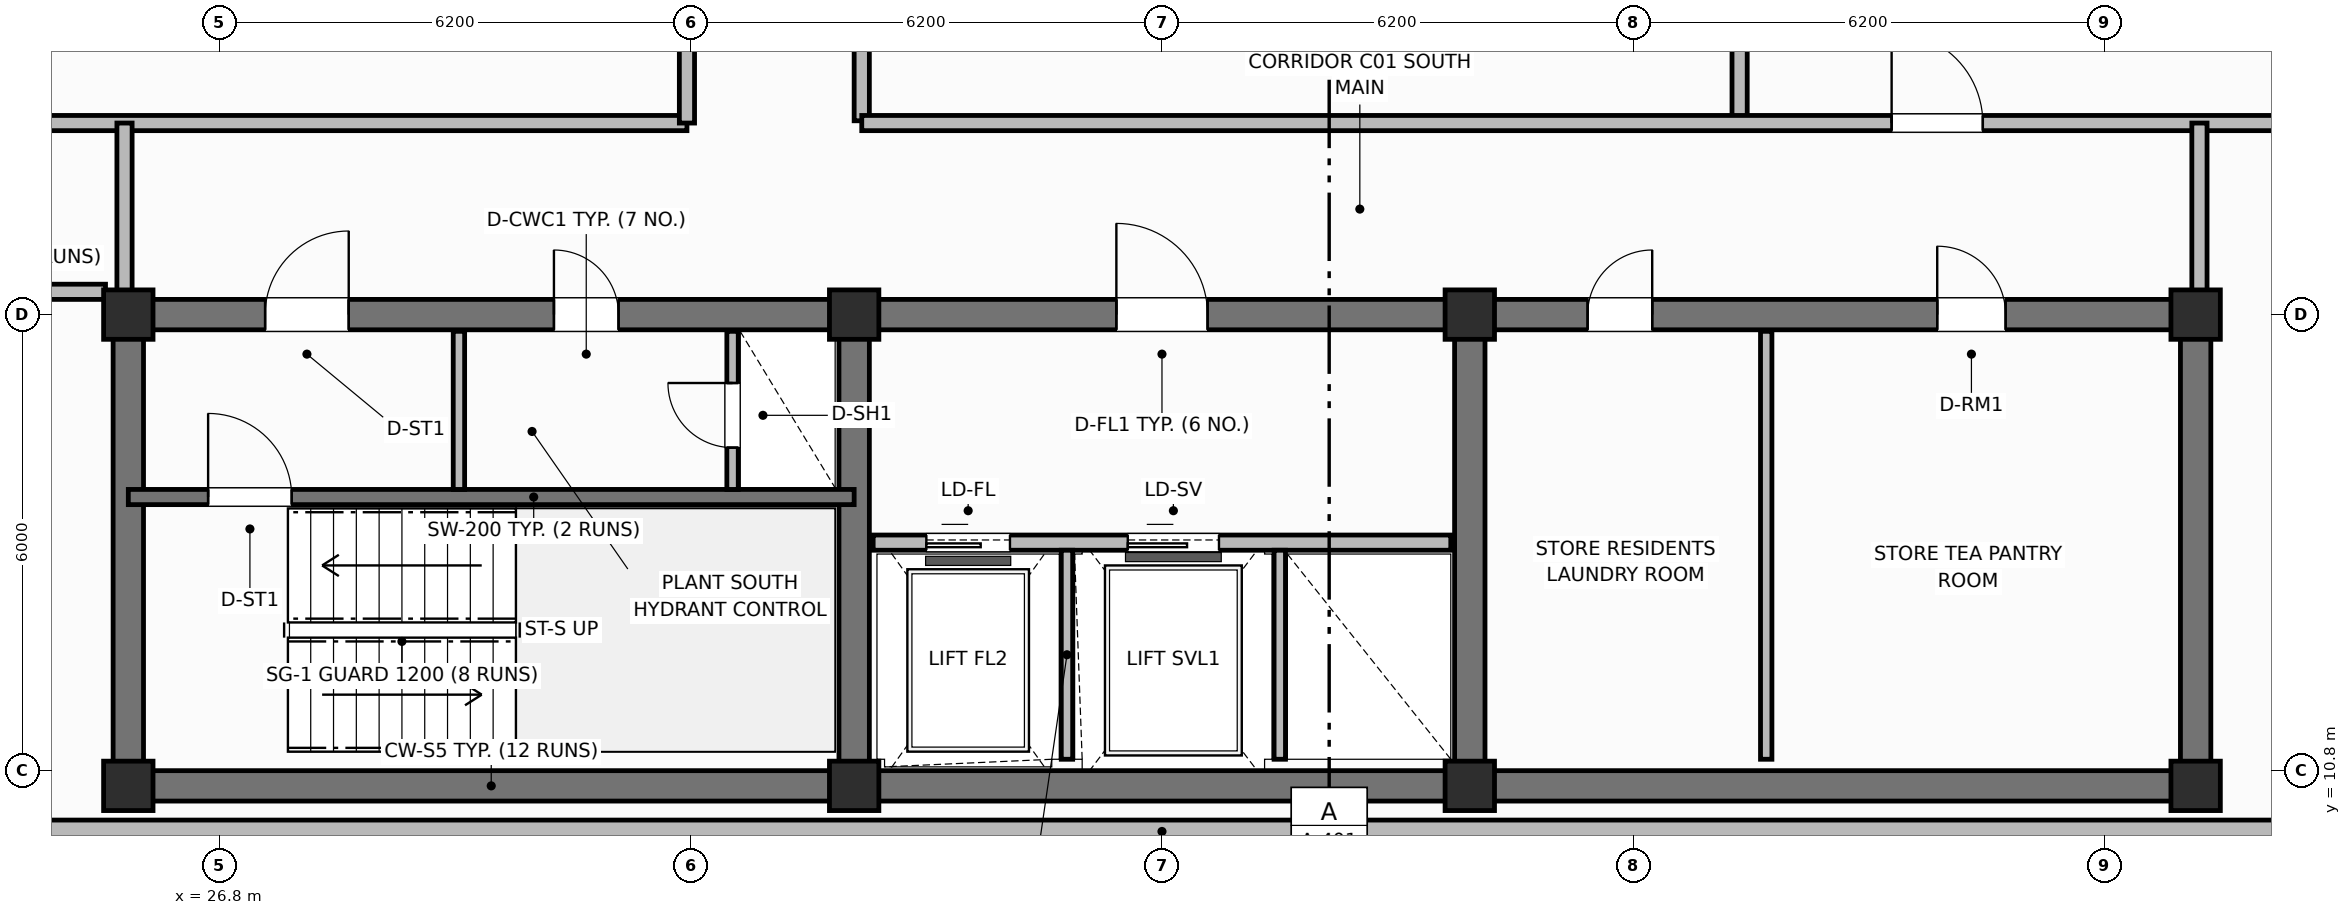
"""IFC4 building model, lengths in metres.
Left out: names, types, materials, properties, quantities, classifications, styles, units other than length and angle.
Written with IfcOpenShell. Run it as: python <this file> out.ifc"""

import sys

from ifc_helpers import new_model, si_unit, direction, frame, frame_2d, origin, origin_2d, place, context, subcontext, project, spatial, rectangle, extrude, element, fill, save


model = new_model("IFC4")
c1 = context("Model", 3, precision=1e-05, world=origin(), true_north=direction((0.0, 1.0)))
c2 = subcontext(c1, "Body", "Model", "MODEL_VIEW")
j1 = project(units=[si_unit("LENGTHUNIT", "METRE"), si_unit("PLANEANGLEUNIT", "RADIAN")], contexts=[c1])
p1 = place(None, origin())
s1 = spatial("IfcSite", under=j1, at=p1, CompositionType="ELEMENT")
p2 = place(p1, origin())
s2 = spatial("IfcBuilding", under=s1, at=p2, CompositionType="ELEMENT")
p3 = place(p2, frame((0.0, 0.0, 302.0)))
s3 = spatial("IfcBuildingStorey", under=s2, at=p3, CompositionType="ELEMENT", Elevation=302.0)
p4 = place(p3, frame((52.8, 10.6, 0.0), z_axis=(0.0, 0.0, 1.0), x_axis=(-1.0, 0.0, 0.0)))
e1 = element("IfcWall", 1, at=p4, inside=s3, PredefinedType="SHEAR", context=c2, shape_type="SweptSolid", body=[
    extrude(rectangle(XDim=27.2, YDim=0.4, at=frame_2d((13.6, 0.0))), origin(), (0.0, 0.0, 1.0), 3.6),
])
for number, where, z_axis, x_axis in (
    (2, (25.6, 10.8, 0.0), (0.0, 0.0, 1.0), (0.0, 1.0, 0.0)),
    (3, (52.8, 10.8, 0.0), (0.0, 0.0, 1.0), (0.0, 1.0, 0.0)),
):
    element("IfcWall", number, at=place(p3, frame(where, z_axis=z_axis, x_axis=x_axis)), inside=s3, PredefinedType="SHEAR", context=c2, shape_type="SweptSolid", body=[
        extrude(rectangle(XDim=5.8, YDim=0.4, at=frame_2d((2.9, 0.0))), origin(), (0.0, 0.0, 1.0), 3.6),
    ])
p5 = place(p3, frame((25.6, 16.8, 0.0), z_axis=(0.0, 0.0, 1.0), x_axis=(1.0, 0.0, 0.0)))
e4 = element("IfcWall", 4, at=p5, inside=s3, PredefinedType="SHEAR", context=c2, shape_type="SweptSolid", body=[
    extrude(rectangle(XDim=27.2, YDim=0.4, at=frame_2d((13.6, 0.0))), origin(), (0.0, 0.0, 1.0), 3.6),
])
p6 = place(p5, frame((1.8, 0.0, 0.0)))
e5 = element("IfcOpeningElement", 5, at=p6, cuts=e4, PredefinedType="OPENING", context=c2, shape_type="SweptSolid", body=[
    extrude(rectangle(XDim=1.1, YDim=2.15, at=frame_2d((0.55, 1.075))), frame((0.0, 0.21, 0.0), z_axis=(0.0, -1.0, 0.0), x_axis=(1.0, 0.0, 0.0)), (0.0, 0.0, 1.0), 0.42),
])
p7 = place(p5, frame((5.6, 0.0, 0.0)))
e6 = element("IfcOpeningElement", 6, at=p7, cuts=e4, PredefinedType="OPENING", context=c2, shape_type="SweptSolid", body=[
    extrude(rectangle(XDim=0.85, YDim=2.1, at=frame_2d((0.425, 1.05))), frame((0.0, 0.21, 0.0), z_axis=(0.0, -1.0, 0.0), x_axis=(1.0, 0.0, 0.0)), (0.0, 0.0, 1.0), 0.42),
])
p8 = place(p5, frame((13.0, 0.0, 0.0)))
e7 = element("IfcOpeningElement", 7, at=p8, cuts=e4, PredefinedType="OPENING", context=c2, shape_type="SweptSolid", body=[
    extrude(rectangle(XDim=1.2, YDim=2.15, at=frame_2d((0.6, 1.075))), frame((0.0, 0.21, 0.0), z_axis=(0.0, -1.0, 0.0), x_axis=(1.0, 0.0, 0.0)), (0.0, 0.0, 1.0), 0.42),
])
p9 = place(p5, frame((19.2, 0.0, 0.0)))
e8 = element("IfcOpeningElement", 8, at=p9, cuts=e4, PredefinedType="OPENING", context=c2, shape_type="SweptSolid", body=[
    extrude(rectangle(XDim=0.85, YDim=2.1, at=frame_2d((0.425, 1.05))), frame((0.0, 0.21, 0.0), z_axis=(0.0, -1.0, 0.0), x_axis=(1.0, 0.0, 0.0)), (0.0, 0.0, 1.0), 0.42),
])
p10 = place(p5, frame((23.8, 0.0, 0.0)))
e9 = element("IfcOpeningElement", 9, at=p10, cuts=e4, PredefinedType="OPENING", context=c2, shape_type="SweptSolid", body=[
    extrude(rectangle(XDim=0.9, YDim=2.1, at=frame_2d((0.45, 1.05))), frame((0.0, 0.21, 0.0), z_axis=(0.0, -1.0, 0.0), x_axis=(1.0, 0.0, 0.0)), (0.0, 0.0, 1.0), 0.42),
])
for number, where, z_axis, x_axis in (
    (10, (35.15, 10.8, 0.0), (0.0, 0.0, 1.0), (0.0, 1.0, 0.0)),
    (11, (43.25, 10.8, 0.0), (0.0, 0.0, 1.0), (0.0, 1.0, 0.0)),
):
    element("IfcWall", number, at=place(p3, frame(where, z_axis=z_axis, x_axis=x_axis)), inside=s3, PredefinedType="SHEAR", context=c2, shape_type="SweptSolid", body=[
        extrude(rectangle(XDim=5.8, YDim=0.4, at=frame_2d((2.9, 0.0))), origin(), (0.0, 0.0, 1.0), 3.6),
    ])
for number, where, z_axis, x_axis in (
    (12, (25.6, 10.6, 0.0), (0.0, 0.0, 1.0), (1.0, 0.0, 0.0)),
    (13, (25.6, 16.8, 0.0), (0.0, 0.0, 1.0), (1.0, 0.0, 0.0)),
    (14, (35.15, 10.6, 0.0), (0.0, 0.0, 1.0), (1.0, 0.0, 0.0)),
    (15, (35.15, 16.8, 0.0), (0.0, 0.0, 1.0), (1.0, 0.0, 0.0)),
    (16, (43.25, 10.6, 0.0), (0.0, 0.0, 1.0), (1.0, 0.0, 0.0)),
    (17, (43.25, 16.8, 0.0), (0.0, 0.0, 1.0), (1.0, 0.0, 0.0)),
    (18, (52.8, 10.6, 0.0), (0.0, 0.0, 1.0), (1.0, 0.0, 0.0)),
    (19, (52.8, 16.8, 0.0), (0.0, 0.0, 1.0), (1.0, 0.0, 0.0)),
):
    element("IfcColumn", number, at=place(p3, frame(where, z_axis=z_axis, x_axis=x_axis)), inside=s3, PredefinedType="COLUMN", context=c2, shape_type="SweptSolid", body=[
        extrude(rectangle(XDim=0.65, YDim=0.65, at=origin_2d()), origin(), (0.0, 0.0, 1.0), 3.6),
    ])
p11 = place(p3, frame((23.76, 10.0, 0.0), z_axis=(0.0, 0.0, 1.0), x_axis=(1.0, 0.0, 0.0)))
e20 = element("IfcWall", 20, at=p11, inside=s3, PredefinedType="SOLIDWALL", context=c2, shape_type="SweptSolid", body=[
    extrude(rectangle(XDim=30.88, YDim=0.3, at=frame_2d((15.44, 0.0))), origin(), (0.0, 0.0, 1.0), 2.84),
])
p12 = place(p3, frame((25.6, 14.4, 0.0), z_axis=(0.0, 0.0, 1.0), x_axis=(1.0, 0.0, 0.0)))
e21 = element("IfcWall", 21, at=p12, inside=s3, PredefinedType="SHEAR", context=c2, shape_type="SweptSolid", body=[
    extrude(rectangle(XDim=9.55, YDim=0.2, at=frame_2d((4.775, 0.0))), origin(), (0.0, 0.0, 1.0), 3.6),
])
p13 = place(p12, frame((1.05, 0.0, 0.0)))
e22 = element("IfcOpeningElement", 22, at=p13, cuts=e21, PredefinedType="OPENING", context=c2, shape_type="SweptSolid", body=[
    extrude(rectangle(XDim=1.1, YDim=2.15, at=frame_2d((0.55, 1.075))), frame((0.0, 0.11, 0.0), z_axis=(0.0, -1.0, 0.0), x_axis=(1.0, 0.0, 0.0)), (0.0, 0.0, 1.0), 0.22),
])
p14 = place(p3, frame((29.95, 14.5, 0.0), z_axis=(0.0, 0.0, 1.0), x_axis=(0.0, 1.0, 0.0)))
e23 = element("IfcWall", 23, at=p14, inside=s3, PredefinedType="PARTITIONING", context=c2, shape_type="SweptSolid", body=[
    extrude(rectangle(XDim=2.08, YDim=0.15, at=frame_2d((1.04, 0.0))), origin(), (0.0, 0.0, 1.0), 2.54),
])
p15 = place(p3, frame((33.55, 14.5, 0.0), z_axis=(0.0, 0.0, 1.0), x_axis=(0.0, 1.0, 0.0)))
e24 = element("IfcWall", 24, at=p15, inside=s3, PredefinedType="PARTITIONING", context=c2, shape_type="SweptSolid", body=[
    extrude(rectangle(XDim=2.08, YDim=0.15, at=frame_2d((1.04, 0.0))), origin(), (0.0, 0.0, 1.0), 2.54),
])
p16 = place(p15, frame((0.55, 0.0, 0.0)))
e25 = element("IfcOpeningElement", 25, at=p16, cuts=e24, PredefinedType="OPENING", context=c2, shape_type="SweptSolid", body=[
    extrude(rectangle(XDim=0.85, YDim=2.05, at=frame_2d((0.425, 1.025))), frame((0.0, 0.085, 0.0), z_axis=(0.0, -1.0, 0.0), x_axis=(1.0, 0.0, 0.0)), (0.0, 0.0, 1.0), 0.17),
])
p17 = place(p3, frame((35.4, 13.8, 0.0), z_axis=(0.0, 0.0, 1.0), x_axis=(1.0, 0.0, 0.0)))
e26 = element("IfcWall", 26, at=p17, inside=s3, PredefinedType="PARTITIONING", context=c2, shape_type="SweptSolid", body=[
    extrude(rectangle(XDim=7.6, YDim=0.2, at=frame_2d((3.8, 0.0))), origin(), (0.0, 0.0, 1.0), 2.2),
])
p18 = place(p17, frame((0.7, 0.0, 0.0)))
e27 = element("IfcOpeningElement", 27, at=p18, cuts=e26, PredefinedType="OPENING", context=c2, shape_type="SweptSolid", body=[
    extrude(rectangle(XDim=1.1, YDim=2.15, at=frame_2d((0.55, 1.075))), frame((0.0, 0.11, 0.0), z_axis=(0.0, -1.0, 0.0), x_axis=(1.0, 0.0, 0.0)), (0.0, 0.0, 1.0), 0.22),
])
p19 = place(p17, frame((3.35, 0.0, 0.0)))
e28 = element("IfcOpeningElement", 28, at=p19, cuts=e26, PredefinedType="OPENING", context=c2, shape_type="SweptSolid", body=[
    extrude(rectangle(XDim=1.2, YDim=2.15, at=frame_2d((0.6, 1.075))), frame((0.0, 0.11, 0.0), z_axis=(0.0, -1.0, 0.0), x_axis=(1.0, 0.0, 0.0)), (0.0, 0.0, 1.0), 0.22),
])
for number, where, z_axis, x_axis in (
    (29, (37.95, 10.95, 0.0), (0.0, 0.0, 1.0), (0.0, 1.0, 0.0)),
    (30, (40.75, 10.95, 0.0), (0.0, 0.0, 1.0), (0.0, 1.0, 0.0)),
):
    element("IfcWall", number, at=place(p3, frame(where, z_axis=z_axis, x_axis=x_axis)), inside=s3, PredefinedType="PARTITIONING", context=c2, shape_type="SweptSolid", body=[
        extrude(rectangle(XDim=2.75, YDim=0.15, at=frame_2d((1.375, 0.0))), origin(), (0.0, 0.0, 1.0), 2.54),
    ])
p20 = place(p3, frame((47.15, 10.95, 0.0), z_axis=(0.0, 0.0, 1.0), x_axis=(0.0, 1.0, 0.0)))
e31 = element("IfcWall", 31, at=p20, inside=s3, PredefinedType="PARTITIONING", context=c2, shape_type="SweptSolid", body=[
    extrude(rectangle(XDim=5.63, YDim=0.15, at=frame_2d((2.815, 0.0))), origin(), (0.0, 0.0, 1.0), 2.54),
])
p21 = place(p3, frame((21.53, 19.32, 0.0), z_axis=(0.0, 0.0, 1.0), x_axis=(1.0, 0.0, 0.0)))
e32 = element("IfcWall", 32, at=p21, inside=s3, PredefinedType="PARTITIONING", context=c2, shape_type="SweptSolid", body=[
    extrude(rectangle(XDim=11.42, YDim=0.2, at=frame_2d((5.71, 0.0))), origin(), (0.0, 0.0, 1.0), 2.54),
])
p22 = place(p3, frame((32.95, 19.32, 0.0), z_axis=(0.0, 0.0, 1.0), x_axis=(0.0, 1.0, 0.0)))
e33 = element("IfcWall", 33, at=p22, inside=s3, PredefinedType="PARTITIONING", context=c2, shape_type="SweptSolid", body=[
    extrude(rectangle(XDim=17.76, YDim=0.2, at=frame_2d((8.88, 0.0))), origin(), (0.0, 0.0, 1.0), 2.54),
])
p23 = place(p22, frame((6.0, 0.0, 0.0)))
e34 = element("IfcOpeningElement", 34, at=p23, cuts=e33, PredefinedType="OPENING", context=c2, shape_type="SweptSolid", body=[
    extrude(rectangle(XDim=1.2, YDim=2.15, at=frame_2d((0.6, 1.075))), frame((0.0, 0.11, 0.0), z_axis=(0.0, -1.0, 0.0), x_axis=(1.0, 0.0, 0.0)), (0.0, 0.0, 1.0), 0.22),
])
p24 = place(p3, frame((35.25, 19.35, 0.0), z_axis=(0.0, 0.0, 1.0), x_axis=(0.0, 1.0, 0.0)))
e35 = element("IfcWall", 35, at=p24, inside=s3, PredefinedType="PARTITIONING", context=c2, shape_type="SweptSolid", body=[
    extrude(rectangle(XDim=17.7, YDim=0.2, at=frame_2d((8.85, 0.0))), origin(), (0.0, 0.0, 1.0), 2.54),
])
p25 = place(p24, frame((6.0, 0.0, 0.0)))
e36 = element("IfcOpeningElement", 36, at=p25, cuts=e35, PredefinedType="OPENING", context=c2, shape_type="SweptSolid", body=[
    extrude(rectangle(XDim=1.2, YDim=2.15, at=frame_2d((0.6, 1.075))), frame((0.0, 0.11, 0.0), z_axis=(0.0, -1.0, 0.0), x_axis=(1.0, 0.0, 0.0)), (0.0, 0.0, 1.0), 0.22),
])
p26 = place(p3, frame((46.8, 19.35, 0.0), z_axis=(0.0, 0.0, 1.0), x_axis=(0.0, 1.0, 0.0)))
e37 = element("IfcWall", 37, at=p26, inside=s3, PredefinedType="PARTITIONING", context=c2, shape_type="SweptSolid", body=[
    extrude(rectangle(XDim=17.7, YDim=0.2, at=frame_2d((8.85, 0.0))), origin(), (0.0, 0.0, 1.0), 2.54),
])
p27 = place(p3, frame((35.25, 19.32, 0.0), z_axis=(0.0, 0.0, 1.0), x_axis=(1.0, 0.0, 0.0)))
e38 = element("IfcWall", 38, at=p27, inside=s3, PredefinedType="PARTITIONING", context=c2, shape_type="SweptSolid", body=[
    extrude(rectangle(XDim=21.62, YDim=0.2, at=frame_2d((10.81, 0.0))), origin(), (0.0, 0.0, 1.0), 2.54),
])
p28 = place(p27, frame((13.55, 0.0, 0.0)))
e39 = element("IfcOpeningElement", 39, at=p28, cuts=e38, PredefinedType="OPENING", context=c2, shape_type="SweptSolid", body=[
    extrude(rectangle(XDim=1.2, YDim=2.15, at=frame_2d((0.6, 1.075))), frame((0.0, 0.11, 0.0), z_axis=(0.0, -1.0, 0.0), x_axis=(1.0, 0.0, 0.0)), (0.0, 0.0, 1.0), 0.22),
])
for number, where, z_axis, x_axis in (
    (40, (52.85, 16.95, 0.0), (0.0, 0.0, 1.0), (0.0, 1.0, 0.0)),
    (41, (25.55, 16.95, 0.0), (0.0, 0.0, 1.0), (0.0, 1.0, 0.0)),
):
    element("IfcWall", number, at=place(p3, frame(where, z_axis=z_axis, x_axis=x_axis)), inside=s3, PredefinedType="PARTITIONING", context=c2, shape_type="SweptSolid", body=[
        extrude(rectangle(XDim=2.37, YDim=0.2, at=frame_2d((1.185, 0.0))), origin(), (0.0, 0.0, 1.0), 2.54),
    ])
p29 = place(p3, frame((21.53, 17.1, 0.0), z_axis=(0.0, 0.0, 1.0), x_axis=(1.0, 0.0, 0.0)))
e42 = element("IfcWall", 42, at=p29, inside=s3, PredefinedType="PARTITIONING", context=c2, shape_type="SweptSolid", body=[
    extrude(rectangle(XDim=3.77, YDim=0.2, at=frame_2d((1.885, 0.0))), origin(), (0.0, 0.0, 1.0), 2.54),
])
p30 = place(p13, origin())
e43 = element("IfcDoor", 43, at=p30, inside=s3, OperationType="SINGLE_SWING_LEFT", PredefinedType="DOOR", context=c2, shape_type="SweptSolid", body=[
    extrude(rectangle(XDim=1.1, YDim=2.15, at=frame_2d((0.55, 1.075))), frame((0.0, 0.025, 0.0), z_axis=(0.0, -1.0, 0.0), x_axis=(1.0, 0.0, 0.0)), (0.0, 0.0, 1.0), 0.05),
])
fill(e22, e43)
p31 = place(p16, origin())
e44 = element("IfcDoor", 44, at=p31, inside=s3, OperationType="SINGLE_SWING_RIGHT", PredefinedType="TRAPDOOR", context=c2, shape_type="SweptSolid", body=[
    extrude(rectangle(XDim=0.85, YDim=2.05, at=frame_2d((0.425, 1.025))), frame((0.0, 0.025, 0.0), z_axis=(0.0, -1.0, 0.0), x_axis=(1.0, 0.0, 0.0)), (0.0, 0.0, 1.0), 0.05),
])
fill(e25, e44)
p32 = place(p18, origin())
e45 = element("IfcDoor", 45, at=p32, inside=s3, OperationType="SLIDING_TO_LEFT", PredefinedType="DOOR", context=c2, shape_type="SweptSolid", body=[
    extrude(rectangle(XDim=1.1, YDim=2.15, at=frame_2d((0.55, 1.075))), frame((0.0, 0.025, 0.0), z_axis=(0.0, -1.0, 0.0), x_axis=(1.0, 0.0, 0.0)), (0.0, 0.0, 1.0), 0.05),
])
fill(e27, e45)
p33 = place(p19, origin())
e46 = element("IfcDoor", 46, at=p33, inside=s3, OperationType="SLIDING_TO_LEFT", PredefinedType="DOOR", context=c2, shape_type="SweptSolid", body=[
    extrude(rectangle(XDim=1.2, YDim=2.15, at=frame_2d((0.6, 1.075))), frame((0.0, 0.025, 0.0), z_axis=(0.0, -1.0, 0.0), x_axis=(1.0, 0.0, 0.0)), (0.0, 0.0, 1.0), 0.05),
])
fill(e28, e46)
p34 = place(p28, origin())
e47 = element("IfcDoor", 47, at=p34, inside=s3, OperationType="SINGLE_SWING_LEFT", PredefinedType="DOOR", context=c2, shape_type="SweptSolid", body=[
    extrude(rectangle(XDim=1.2, YDim=2.15, at=frame_2d((0.6, 1.075))), frame((0.0, 0.025, 0.0), z_axis=(0.0, -1.0, 0.0), x_axis=(1.0, 0.0, 0.0)), (0.0, 0.0, 1.0), 0.05),
])
fill(e39, e47)
p35 = place(p6, origin())
e48 = element("IfcDoor", 48, at=p35, inside=s3, OperationType="SINGLE_SWING_RIGHT", PredefinedType="DOOR", context=c2, shape_type="SweptSolid", body=[
    extrude(rectangle(XDim=1.1, YDim=2.15, at=frame_2d((0.55, 1.075))), frame((0.0, 0.025, 0.0), z_axis=(0.0, -1.0, 0.0), x_axis=(1.0, 0.0, 0.0)), (0.0, 0.0, 1.0), 0.05),
])
fill(e5, e48)
p36 = place(p7, origin())
e49 = element("IfcDoor", 49, at=p36, inside=s3, OperationType="SINGLE_SWING_LEFT", PredefinedType="DOOR", context=c2, shape_type="SweptSolid", body=[
    extrude(rectangle(XDim=0.85, YDim=2.1, at=frame_2d((0.425, 1.05))), frame((0.0, 0.025, 0.0), z_axis=(0.0, -1.0, 0.0), x_axis=(1.0, 0.0, 0.0)), (0.0, 0.0, 1.0), 0.05),
])
fill(e6, e49)
p37 = place(p8, origin())
e50 = element("IfcDoor", 50, at=p37, inside=s3, OperationType="SINGLE_SWING_LEFT", PredefinedType="DOOR", context=c2, shape_type="SweptSolid", body=[
    extrude(rectangle(XDim=1.2, YDim=2.15, at=frame_2d((0.6, 1.075))), frame((0.0, 0.025, 0.0), z_axis=(0.0, -1.0, 0.0), x_axis=(1.0, 0.0, 0.0)), (0.0, 0.0, 1.0), 0.05),
])
fill(e7, e50)
p38 = place(p9, origin())
e51 = element("IfcDoor", 51, at=p38, inside=s3, OperationType="SINGLE_SWING_RIGHT", PredefinedType="DOOR", context=c2, shape_type="SweptSolid", body=[
    extrude(rectangle(XDim=0.85, YDim=2.1, at=frame_2d((0.425, 1.05))), frame((0.0, 0.025, 0.0), z_axis=(0.0, -1.0, 0.0), x_axis=(1.0, 0.0, 0.0)), (0.0, 0.0, 1.0), 0.05),
])
fill(e8, e51)
p39 = place(p10, origin())
e52 = element("IfcDoor", 52, at=p39, inside=s3, OperationType="SINGLE_SWING_LEFT", PredefinedType="DOOR", context=c2, shape_type="SweptSolid", body=[
    extrude(rectangle(XDim=0.9, YDim=2.1, at=frame_2d((0.45, 1.05))), frame((0.0, 0.025, 0.0), z_axis=(0.0, -1.0, 0.0), x_axis=(1.0, 0.0, 0.0)), (0.0, 0.0, 1.0), 0.05),
])
fill(e9, e52)
save(model, sys.argv[1])
